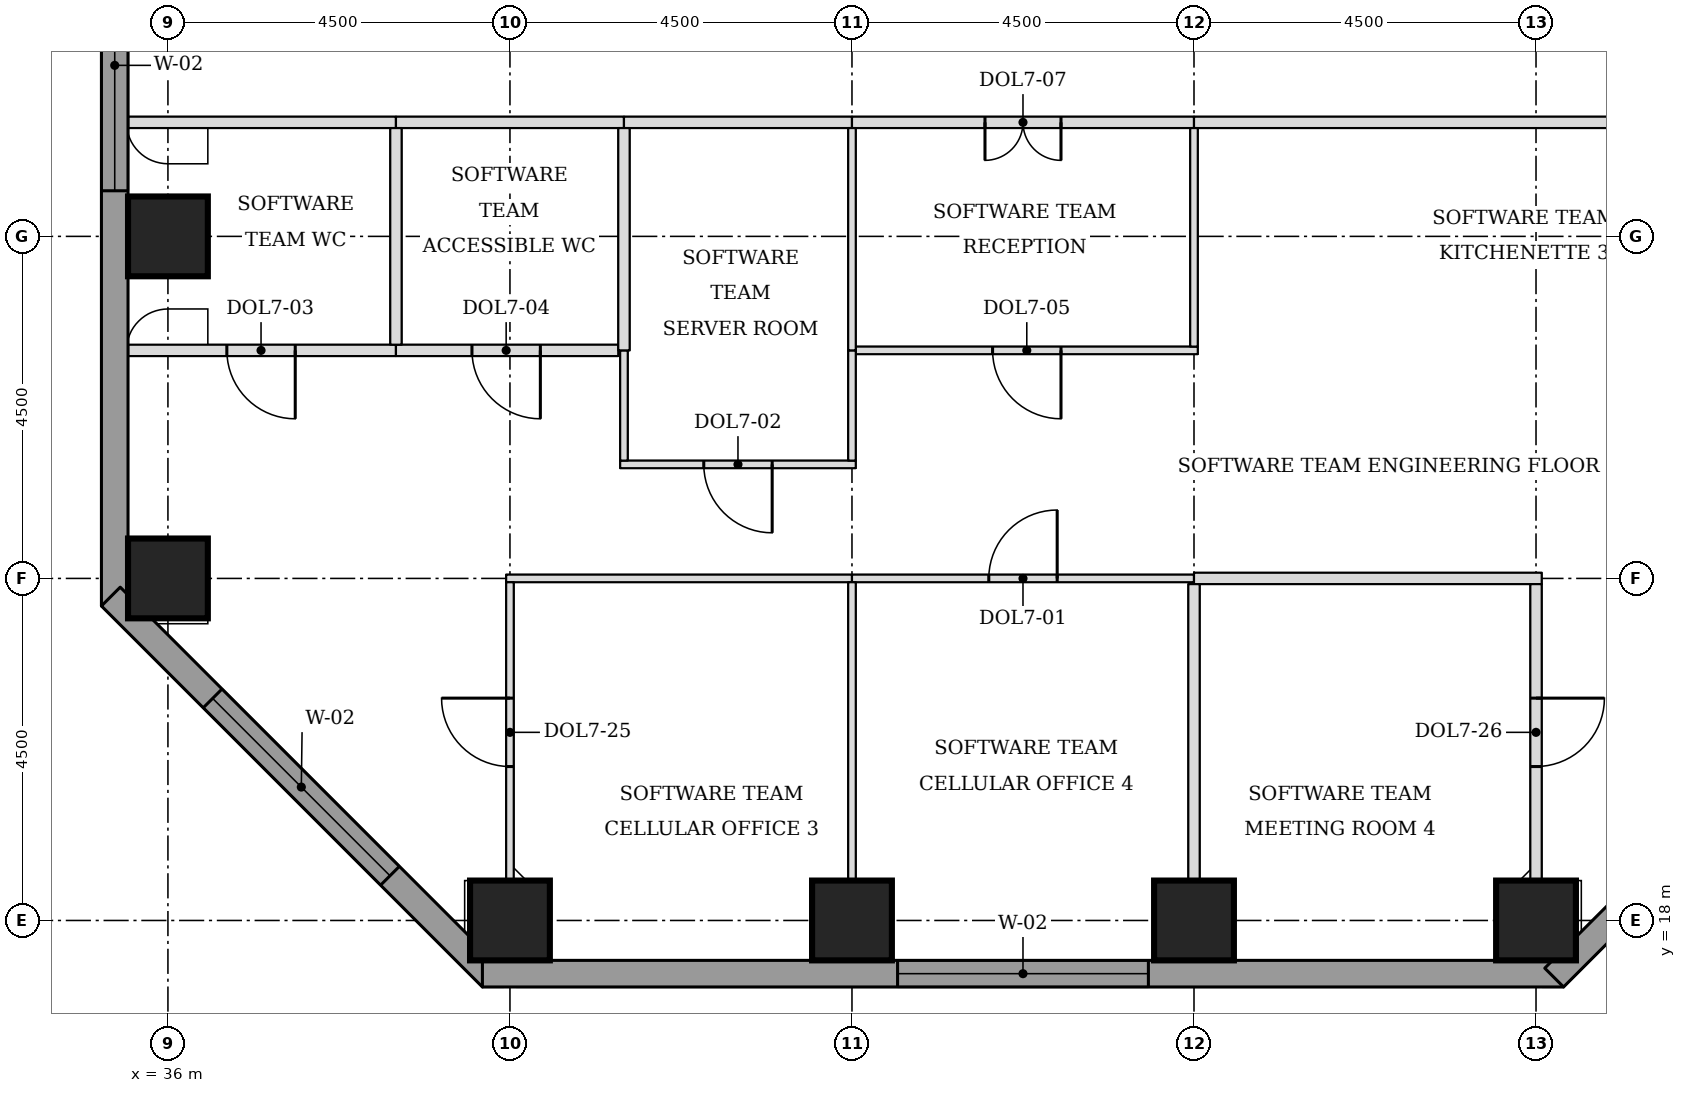
"""IFC4 building model, lengths in metres.
Left out: names, types, materials, properties, quantities, classifications, styles, units other than length and angle.
Written with IfcOpenShell. Run it as: python <this file> out.ifc"""

import sys

from ifc_helpers import new_model, si_unit, direction, frame, frame_2d, origin, origin_2d, place, context, subcontext, project, spatial, rectangle, extrude, element, fill, save


model = new_model("IFC4")
c1 = context("Model", 3, precision=1e-05, world=origin(), true_north=direction((0.0, 1.0)))
c2 = subcontext(c1, "Body", "Model", "MODEL_VIEW")
j1 = project(units=[si_unit("LENGTHUNIT", "METRE"), si_unit("PLANEANGLEUNIT", "RADIAN")], contexts=[c1])
p1 = place(None, origin())
s1 = spatial("IfcSite", under=j1, at=p1, CompositionType="ELEMENT")
p2 = place(p1, origin())
s2 = spatial("IfcBuilding", under=s1, at=p2, CompositionType="ELEMENT")
p3 = place(p2, frame((0.0, 0.0, 127.0)))
s3 = spatial("IfcBuildingStorey", under=s2, at=p3, CompositionType="ELEMENT", Elevation=127.0)
for number, where, z_axis, x_axis in (
    (1, (40.5, 18.0, 0.0), (0.0, 0.0, 1.0), (1.0, 0.0, 0.0)),
    (2, (45.0, 18.0, 0.0), (0.0, 0.0, 1.0), (1.0, 0.0, 0.0)),
    (3, (49.5, 18.0, 0.0), (0.0, 0.0, 1.0), (1.0, 0.0, 0.0)),
    (4, (54.0, 18.0, 0.0), (0.0, 0.0, 1.0), (1.0, 0.0, 0.0)),
    (5, (36.0, 22.5, 0.0), (0.0, 0.0, 1.0), (1.0, 0.0, 0.0)),
    (6, (36.0, 27.0, 0.0), (0.0, 0.0, 1.0), (1.0, 0.0, 0.0)),
):
    element("IfcColumn", number, at=place(p3, frame(where, z_axis=z_axis, x_axis=x_axis)), inside=s3, PredefinedType="COLUMN", context=c2, shape_type="SweptSolid", body=[
        extrude(rectangle(XDim=1.05, YDim=1.05, at=origin_2d()), origin(), (0.0, 0.0, 1.0), 3.7),
    ])
p4 = place(p3, frame((35.3, 39.975, 0.0), z_axis=(0.0, 0.0, 1.0), x_axis=(0.0, -1.0, 0.0)))
e7 = element("IfcWall", 7, at=p4, inside=s3, PredefinedType="STANDARD", context=c2, shape_type="SweptSolid", body=[
    extrude(rectangle(XDim=17.837, YDim=0.35, at=frame_2d((8.919, 0.0))), origin(), (0.0, 0.0, 1.0), 3.525),
])
p5 = place(p4, frame((0.5, 0.0, 0.9)))
e8 = element("IfcOpeningElement", 8, at=p5, cuts=e7, PredefinedType="OPENING", context=c2, shape_type="SweptSolid", body=[
    extrude(rectangle(XDim=3.3, YDim=1.9, at=frame_2d((1.65, 0.95))), frame((0.0, 0.185, 0.0), z_axis=(0.0, -1.0, 0.0), x_axis=(1.0, 0.0, 0.0)), (0.0, 0.0, 1.0), 0.37),
])
p6 = place(p4, frame((9.075, 0.0, 0.9)))
e9 = element("IfcOpeningElement", 9, at=p6, cuts=e7, PredefinedType="OPENING", context=c2, shape_type="SweptSolid", body=[
    extrude(rectangle(XDim=3.3, YDim=1.9, at=frame_2d((1.65, 0.95))), frame((0.0, 0.185, 0.0), z_axis=(0.0, -1.0, 0.0), x_axis=(1.0, 0.0, 0.0)), (0.0, 0.0, 1.0), 0.37),
])
p7 = place(p3, frame((35.249, 22.261, 0.0), z_axis=(0.0, 0.0, 1.0), x_axis=(0.707106781187, -0.707106781187, 0.0)))
e10 = element("IfcWall", 10, at=p7, inside=s3, PredefinedType="STANDARD", context=c2, shape_type="SweptSolid", body=[
    extrude(rectangle(XDim=7.089, YDim=0.35, at=frame_2d((3.544, 0.0))), origin(), (0.0, 0.0, 1.0), 3.525),
])
p8 = place(p7, frame((1.894, 0.0, 0.9)))
e11 = element("IfcOpeningElement", 11, at=p8, cuts=e10, PredefinedType="OPENING", context=c2, shape_type="SweptSolid", body=[
    extrude(rectangle(XDim=3.3, YDim=1.9, at=frame_2d((1.65, 0.95))), frame((0.0, 0.185, 0.0), z_axis=(0.0, -1.0, 0.0), x_axis=(1.0, 0.0, 0.0)), (0.0, 0.0, 1.0), 0.37),
])
p9 = place(p3, frame((40.138, 17.3, 0.0), z_axis=(0.0, 0.0, 1.0), x_axis=(1.0, 0.0, 0.0)))
e12 = element("IfcWall", 12, at=p9, inside=s3, PredefinedType="STANDARD", context=c2, shape_type="SweptSolid", body=[
    extrude(rectangle(XDim=14.225, YDim=0.35, at=frame_2d((7.112, 0.0))), origin(), (0.0, 0.0, 1.0), 3.525),
])
p10 = place(p9, frame((5.462, 0.0, 0.9)))
e13 = element("IfcOpeningElement", 13, at=p10, cuts=e12, PredefinedType="OPENING", context=c2, shape_type="SweptSolid", body=[
    extrude(rectangle(XDim=3.3, YDim=1.9, at=frame_2d((1.65, 0.95))), frame((0.0, 0.185, 0.0), z_axis=(0.0, -1.0, 0.0), x_axis=(1.0, 0.0, 0.0)), (0.0, 0.0, 1.0), 0.37),
])
p11 = place(p3, frame((54.239, 17.249, 0.0), z_axis=(0.0, 0.0, 1.0), x_axis=(0.707106781187, 0.707106781187, 0.0)))
e14 = element("IfcWall", 14, at=p11, inside=s3, PredefinedType="STANDARD", context=c2, shape_type="SweptSolid", body=[
    extrude(rectangle(XDim=7.089, YDim=0.35, at=frame_2d((3.544, 0.0))), origin(), (0.0, 0.0, 1.0), 3.525),
])
p12 = place(p11, frame((1.894, 0.0, 0.9)))
e15 = element("IfcOpeningElement", 15, at=p12, cuts=e14, PredefinedType="OPENING", context=c2, shape_type="SweptSolid", body=[
    extrude(rectangle(XDim=3.3, YDim=1.9, at=frame_2d((1.65, 0.95))), frame((0.0, 0.185, 0.0), z_axis=(0.0, -1.0, 0.0), x_axis=(1.0, 0.0, 0.0)), (0.0, 0.0, 1.0), 0.37),
])
p13 = place(p3, frame((40.45, 22.5, 0.0), z_axis=(0.0, 0.0, 1.0), x_axis=(1.0, 0.0, 0.0)))
e16 = element("IfcWall", 16, at=p13, inside=s3, PredefinedType="PARTITIONING", context=c2, shape_type="SweptSolid", body=[
    extrude(rectangle(XDim=4.55, YDim=0.1, at=frame_2d((2.275, 0.0))), origin(), (0.0, 0.0, 1.0), 2.55),
])
p14 = place(p3, frame((45.0, 22.5, 0.0), z_axis=(0.0, 0.0, 1.0), x_axis=(1.0, 0.0, 0.0)))
e17 = element("IfcWall", 17, at=p14, inside=s3, PredefinedType="PARTITIONING", context=c2, shape_type="SweptSolid", body=[
    extrude(rectangle(XDim=4.5, YDim=0.1, at=frame_2d((2.25, 0.0))), origin(), (0.0, 0.0, 1.0), 2.55),
])
p15 = place(p14, frame((1.8, 0.0, 0.0)))
e18 = element("IfcOpeningElement", 18, at=p15, cuts=e17, PredefinedType="OPENING", context=c2, shape_type="SweptSolid", body=[
    extrude(rectangle(XDim=0.9, YDim=2.1, at=frame_2d((0.45, 1.05))), frame((0.0, 0.06, 0.0), z_axis=(0.0, -1.0, 0.0), x_axis=(1.0, 0.0, 0.0)), (0.0, 0.0, 1.0), 0.12),
])
p16 = place(p3, frame((49.5, 22.5, 0.0), z_axis=(0.0, 0.0, 1.0), x_axis=(1.0, 0.0, 0.0)))
e19 = element("IfcWall", 19, at=p16, inside=s3, PredefinedType="PARTITIONING", context=c2, shape_type="SweptSolid", body=[
    extrude(rectangle(XDim=4.575, YDim=0.15, at=frame_2d((2.288, 0.0))), origin(), (0.0, 0.0, 1.0), 2.55),
])
p17 = place(p3, frame((41.95, 24.0, 0.0), z_axis=(0.0, 0.0, 1.0), x_axis=(1.0, 0.0, 0.0)))
e20 = element("IfcWall", 20, at=p17, inside=s3, PredefinedType="PARTITIONING", context=c2, shape_type="SweptSolid", body=[
    extrude(rectangle(XDim=3.1, YDim=0.1, at=frame_2d((1.55, 0.0))), origin(), (0.0, 0.0, 1.0), 3.55),
])
p18 = place(p17, frame((1.1, 0.0, 0.0)))
e21 = element("IfcOpeningElement", 21, at=p18, cuts=e20, PredefinedType="OPENING", context=c2, shape_type="SweptSolid", body=[
    extrude(rectangle(XDim=0.9, YDim=2.1, at=frame_2d((0.45, 1.05))), frame((0.0, 0.06, 0.0), z_axis=(0.0, -1.0, 0.0), x_axis=(1.0, 0.0, 0.0)), (0.0, 0.0, 1.0), 0.12),
])
p19 = place(p3, frame((35.475, 25.5, 0.0), z_axis=(0.0, 0.0, 1.0), x_axis=(1.0, 0.0, 0.0)))
e22 = element("IfcWall", 22, at=p19, inside=s3, PredefinedType="PARTITIONING", context=c2, shape_type="SweptSolid", body=[
    extrude(rectangle(XDim=3.525, YDim=0.15, at=frame_2d((1.762, 0.0))), origin(), (0.0, 0.0, 1.0), 3.55),
])
p20 = place(p19, frame((1.3, 0.0, 0.0)))
e23 = element("IfcOpeningElement", 23, at=p20, cuts=e22, PredefinedType="OPENING", context=c2, shape_type="SweptSolid", body=[
    extrude(rectangle(XDim=0.9, YDim=2.1, at=frame_2d((0.45, 1.05))), frame((0.0, 0.085, 0.0), z_axis=(0.0, -1.0, 0.0), x_axis=(1.0, 0.0, 0.0)), (0.0, 0.0, 1.0), 0.17),
])
p21 = place(p3, frame((39.0, 25.5, 0.0), z_axis=(0.0, 0.0, 1.0), x_axis=(1.0, 0.0, 0.0)))
e24 = element("IfcWall", 24, at=p21, inside=s3, PredefinedType="PARTITIONING", context=c2, shape_type="SweptSolid", body=[
    extrude(rectangle(XDim=2.925, YDim=0.15, at=frame_2d((1.462, 0.0))), origin(), (0.0, 0.0, 1.0), 3.55),
])
p22 = place(p21, frame((1.0, 0.0, 0.0)))
e25 = element("IfcOpeningElement", 25, at=p22, cuts=e24, PredefinedType="OPENING", context=c2, shape_type="SweptSolid", body=[
    extrude(rectangle(XDim=0.9, YDim=2.1, at=frame_2d((0.45, 1.05))), frame((0.0, 0.085, 0.0), z_axis=(0.0, -1.0, 0.0), x_axis=(1.0, 0.0, 0.0)), (0.0, 0.0, 1.0), 0.17),
])
p23 = place(p3, frame((45.05, 25.5, 0.0), z_axis=(0.0, 0.0, 1.0), x_axis=(1.0, 0.0, 0.0)))
e26 = element("IfcWall", 26, at=p23, inside=s3, PredefinedType="PARTITIONING", context=c2, shape_type="SweptSolid", body=[
    extrude(rectangle(XDim=4.5, YDim=0.1, at=frame_2d((2.25, 0.0))), origin(), (0.0, 0.0, 1.0), 3.55),
])
p24 = place(p23, frame((1.8, 0.0, 0.0)))
e27 = element("IfcOpeningElement", 27, at=p24, cuts=e26, PredefinedType="OPENING", context=c2, shape_type="SweptSolid", body=[
    extrude(rectangle(XDim=0.9, YDim=2.1, at=frame_2d((0.45, 1.05))), frame((0.0, 0.06, 0.0), z_axis=(0.0, -1.0, 0.0), x_axis=(1.0, 0.0, 0.0)), (0.0, 0.0, 1.0), 0.12),
])
p25 = place(p3, frame((35.475, 28.5, 0.0), z_axis=(0.0, 0.0, 1.0), x_axis=(1.0, 0.0, 0.0)))
e28 = element("IfcWall", 28, at=p25, inside=s3, PredefinedType="PARTITIONING", context=c2, shape_type="SweptSolid", body=[
    extrude(rectangle(XDim=3.525, YDim=0.15, at=frame_2d((1.762, 0.0))), origin(), (0.0, 0.0, 1.0), 3.55),
])
for number, where, z_axis, x_axis in (
    (29, (39.0, 28.5, 0.0), (0.0, 0.0, 1.0), (1.0, 0.0, 0.0)),
    (30, (42.0, 28.5, 0.0), (0.0, 0.0, 1.0), (1.0, 0.0, 0.0)),
):
    element("IfcWall", number, at=place(p3, frame(where, z_axis=z_axis, x_axis=x_axis)), inside=s3, PredefinedType="PARTITIONING", context=c2, shape_type="SweptSolid", body=[
        extrude(rectangle(XDim=3.0, YDim=0.15, at=frame_2d((1.5, 0.0))), origin(), (0.0, 0.0, 1.0), 3.55),
    ])
p26 = place(p3, frame((45.0, 28.5, 0.0), z_axis=(0.0, 0.0, 1.0), x_axis=(1.0, 0.0, 0.0)))
e31 = element("IfcWall", 31, at=p26, inside=s3, PredefinedType="PARTITIONING", context=c2, shape_type="SweptSolid", body=[
    extrude(rectangle(XDim=4.5, YDim=0.15, at=frame_2d((2.25, 0.0))), origin(), (0.0, 0.0, 1.0), 3.55),
])
p27 = place(p26, frame((1.75, 0.0, 0.0)))
e32 = element("IfcOpeningElement", 32, at=p27, cuts=e31, PredefinedType="OPENING", context=c2, shape_type="SweptSolid", body=[
    extrude(rectangle(XDim=1.0, YDim=2.1, at=frame_2d((0.5, 1.05))), frame((0.0, 0.085, 0.0), z_axis=(0.0, -1.0, 0.0), x_axis=(1.0, 0.0, 0.0)), (0.0, 0.0, 1.0), 0.17),
])
p28 = place(p3, frame((49.5, 28.5, 0.0), z_axis=(0.0, 0.0, 1.0), x_axis=(1.0, 0.0, 0.0)))
e33 = element("IfcWall", 33, at=p28, inside=s3, PredefinedType="PARTITIONING", context=c2, shape_type="SweptSolid", body=[
    extrude(rectangle(XDim=6.0, YDim=0.15, at=frame_2d((3.0, 0.0))), origin(), (0.0, 0.0, 1.0), 3.55),
])
p29 = place(p3, frame((45.0, 17.475, 0.0), z_axis=(0.0, 0.0, 1.0), x_axis=(0.0, 1.0, 0.0)))
e34 = element("IfcWall", 34, at=p29, inside=s3, PredefinedType="PARTITIONING", context=c2, shape_type="SweptSolid", body=[
    extrude(rectangle(XDim=4.975, YDim=0.1, at=frame_2d((2.487, 0.0))), origin(), (0.0, 0.0, 1.0), 3.55),
])
p30 = place(p3, frame((49.5, 17.475, 0.0), z_axis=(0.0, 0.0, 1.0), x_axis=(0.0, 1.0, 0.0)))
e35 = element("IfcWall", 35, at=p30, inside=s3, PredefinedType="PARTITIONING", context=c2, shape_type="SweptSolid", body=[
    extrude(rectangle(XDim=4.95, YDim=0.15, at=frame_2d((2.475, 0.0))), origin(), (0.0, 0.0, 1.0), 3.55),
])
p31 = place(p3, frame((40.5, 18.525, 0.0), z_axis=(0.0, 0.0, 1.0), x_axis=(0.0, 1.0, 0.0)))
e36 = element("IfcWall", 36, at=p31, inside=s3, PredefinedType="PARTITIONING", context=c2, shape_type="SweptSolid", body=[
    extrude(rectangle(XDim=3.925, YDim=0.1, at=frame_2d((1.962, 0.0))), origin(), (0.0, 0.0, 1.0), 3.55),
])
p32 = place(p31, frame((1.5, 0.0, 0.0)))
e37 = element("IfcOpeningElement", 37, at=p32, cuts=e36, PredefinedType="OPENING", context=c2, shape_type="SweptSolid", body=[
    extrude(rectangle(XDim=0.9, YDim=2.1, at=frame_2d((0.45, 1.05))), frame((0.0, 0.06, 0.0), z_axis=(0.0, -1.0, 0.0), x_axis=(1.0, 0.0, 0.0)), (0.0, 0.0, 1.0), 0.12),
])
p33 = place(p3, frame((54.0, 18.525, 0.0), z_axis=(0.0, 0.0, 1.0), x_axis=(0.0, 1.0, 0.0)))
e38 = element("IfcWall", 38, at=p33, inside=s3, PredefinedType="PARTITIONING", context=c2, shape_type="SweptSolid", body=[
    extrude(rectangle(XDim=3.9, YDim=0.15, at=frame_2d((1.95, 0.0))), origin(), (0.0, 0.0, 1.0), 3.55),
])
p34 = place(p33, frame((1.5, 0.0, 0.0)))
e39 = element("IfcOpeningElement", 39, at=p34, cuts=e38, PredefinedType="OPENING", context=c2, shape_type="SweptSolid", body=[
    extrude(rectangle(XDim=0.9, YDim=2.1, at=frame_2d((0.45, 1.05))), frame((0.0, 0.085, 0.0), z_axis=(0.0, -1.0, 0.0), x_axis=(1.0, 0.0, 0.0)), (0.0, 0.0, 1.0), 0.17),
])
for number, where, z_axis, x_axis in (
    (40, (42.0, 24.05, 0.0), (0.0, 0.0, 1.0), (0.0, 1.0, 0.0)),
    (41, (45.0, 24.05, 0.0), (0.0, 0.0, 1.0), (0.0, 1.0, 0.0)),
):
    element("IfcWall", number, at=place(p3, frame(where, z_axis=z_axis, x_axis=x_axis)), inside=s3, PredefinedType="PARTITIONING", context=c2, shape_type="SweptSolid", body=[
        extrude(rectangle(XDim=1.45, YDim=0.1, at=frame_2d((0.725, 0.0))), origin(), (0.0, 0.0, 1.0), 3.55),
    ])
p35 = place(p3, frame((42.0, 25.5, 0.0), z_axis=(0.0, 0.0, 1.0), x_axis=(0.0, 1.0, 0.0)))
e42 = element("IfcWall", 42, at=p35, inside=s3, PredefinedType="PARTITIONING", context=c2, shape_type="SweptSolid", body=[
    extrude(rectangle(XDim=2.925, YDim=0.15, at=frame_2d((1.462, 0.0))), origin(), (0.0, 0.0, 1.0), 3.55),
])
p36 = place(p3, frame((45.0, 25.5, 0.0), z_axis=(0.0, 0.0, 1.0), x_axis=(0.0, 1.0, 0.0)))
e43 = element("IfcWall", 43, at=p36, inside=s3, PredefinedType="PARTITIONING", context=c2, shape_type="SweptSolid", body=[
    extrude(rectangle(XDim=2.925, YDim=0.1, at=frame_2d((1.462, 0.0))), origin(), (0.0, 0.0, 1.0), 3.55),
])
p37 = place(p3, frame((49.5, 25.55, 0.0), z_axis=(0.0, 0.0, 1.0), x_axis=(0.0, 1.0, 0.0)))
e44 = element("IfcWall", 44, at=p37, inside=s3, PredefinedType="PARTITIONING", context=c2, shape_type="SweptSolid", body=[
    extrude(rectangle(XDim=2.875, YDim=0.1, at=frame_2d((1.438, 0.0))), origin(), (0.0, 0.0, 1.0), 3.55),
])
p38 = place(p3, frame((39.0, 25.575, 0.0), z_axis=(0.0, 0.0, 1.0), x_axis=(0.0, 1.0, 0.0)))
e45 = element("IfcWall", 45, at=p38, inside=s3, PredefinedType="PARTITIONING", context=c2, shape_type="SweptSolid", body=[
    extrude(rectangle(XDim=2.85, YDim=0.15, at=frame_2d((1.425, 0.0))), origin(), (0.0, 0.0, 1.0), 3.55),
])
p39 = place(p6, origin())
e46 = element("IfcWindow", 46, at=p39, inside=s3, PartitioningType="SINGLE_PANEL", PredefinedType="WINDOW", context=c2, shape_type="SweptSolid", body=[
    extrude(rectangle(XDim=3.3, YDim=1.9, at=frame_2d((1.65, 0.95))), frame((0.0, 0.085, 0.0), z_axis=(0.0, -1.0, 0.0), x_axis=(1.0, 0.0, 0.0)), (0.0, 0.0, 1.0), 0.06),
])
fill(e9, e46)
p40 = place(p8, origin())
e47 = element("IfcWindow", 47, at=p40, inside=s3, PartitioningType="SINGLE_PANEL", PredefinedType="WINDOW", context=c2, shape_type="SweptSolid", body=[
    extrude(rectangle(XDim=3.3, YDim=1.9, at=frame_2d((1.65, 0.95))), frame((0.0, 0.085, 0.0), z_axis=(0.0, -1.0, 0.0), x_axis=(1.0, 0.0, 0.0)), (0.0, 0.0, 1.0), 0.06),
])
fill(e11, e47)
p41 = place(p10, origin())
e48 = element("IfcWindow", 48, at=p41, inside=s3, PartitioningType="SINGLE_PANEL", PredefinedType="WINDOW", context=c2, shape_type="SweptSolid", body=[
    extrude(rectangle(XDim=3.3, YDim=1.9, at=frame_2d((1.65, 0.95))), frame((0.0, 0.085, 0.0), z_axis=(0.0, -1.0, 0.0), x_axis=(1.0, 0.0, 0.0)), (0.0, 0.0, 1.0), 0.06),
])
fill(e13, e48)
p42 = place(p27, frame((1.0, 0.0, 0.0), z_axis=(0.0, 0.0, 1.0), x_axis=(-1.0, 0.0, 0.0)))
e49 = element("IfcDoor", 49, at=p42, inside=s3, OperationType="DOUBLE_DOOR_SINGLE_SWING", PredefinedType="DOOR", context=c2, shape_type="SweptSolid", body=[
    extrude(rectangle(XDim=1.0, YDim=2.1, at=frame_2d((0.5, 1.05))), frame((0.0, 0.025, 0.0), z_axis=(0.0, -1.0, 0.0), x_axis=(1.0, 0.0, 0.0)), (0.0, 0.0, 1.0), 0.05),
])
fill(e32, e49)
p43 = place(p24, frame((0.9, 0.0, 0.0), z_axis=(0.0, 0.0, 1.0), x_axis=(-1.0, 0.0, 0.0)))
e50 = element("IfcDoor", 50, at=p43, inside=s3, OperationType="SINGLE_SWING_LEFT", PredefinedType="DOOR", context=c2, shape_type="SweptSolid", body=[
    extrude(rectangle(XDim=0.9, YDim=2.1, at=frame_2d((0.45, 1.05))), frame((0.0, 0.025, 0.0), z_axis=(0.0, -1.0, 0.0), x_axis=(1.0, 0.0, 0.0)), (0.0, 0.0, 1.0), 0.05),
])
fill(e27, e50)
p44 = place(p22, frame((0.9, 0.0, 0.0), z_axis=(0.0, 0.0, 1.0), x_axis=(-1.0, 0.0, 0.0)))
e51 = element("IfcDoor", 51, at=p44, inside=s3, OperationType="SINGLE_SWING_LEFT", PredefinedType="DOOR", context=c2, shape_type="SweptSolid", body=[
    extrude(rectangle(XDim=0.9, YDim=2.1, at=frame_2d((0.45, 1.05))), frame((0.0, 0.025, 0.0), z_axis=(0.0, -1.0, 0.0), x_axis=(1.0, 0.0, 0.0)), (0.0, 0.0, 1.0), 0.05),
])
fill(e25, e51)
p45 = place(p32, origin())
e52 = element("IfcDoor", 52, at=p45, inside=s3, OperationType="SINGLE_SWING_RIGHT", PredefinedType="DOOR", context=c2, shape_type="SweptSolid", body=[
    extrude(rectangle(XDim=0.9, YDim=2.1, at=frame_2d((0.45, 1.05))), frame((0.0, 0.025, 0.0), z_axis=(0.0, -1.0, 0.0), x_axis=(1.0, 0.0, 0.0)), (0.0, 0.0, 1.0), 0.05),
])
fill(e37, e52)
p46 = place(p15, origin())
e53 = element("IfcDoor", 53, at=p46, inside=s3, OperationType="SINGLE_SWING_RIGHT", PredefinedType="DOOR", context=c2, shape_type="SweptSolid", body=[
    extrude(rectangle(XDim=0.9, YDim=2.1, at=frame_2d((0.45, 1.05))), frame((0.0, 0.025, 0.0), z_axis=(0.0, -1.0, 0.0), x_axis=(1.0, 0.0, 0.0)), (0.0, 0.0, 1.0), 0.05),
])
fill(e18, e53)
p47 = place(p34, frame((0.9, 0.0, 0.0), z_axis=(0.0, 0.0, 1.0), x_axis=(-1.0, 0.0, 0.0)))
e54 = element("IfcDoor", 54, at=p47, inside=s3, OperationType="SINGLE_SWING_LEFT", PredefinedType="DOOR", context=c2, shape_type="SweptSolid", body=[
    extrude(rectangle(XDim=0.9, YDim=2.1, at=frame_2d((0.45, 1.05))), frame((0.0, 0.025, 0.0), z_axis=(0.0, -1.0, 0.0), x_axis=(1.0, 0.0, 0.0)), (0.0, 0.0, 1.0), 0.05),
])
fill(e39, e54)
p48 = place(p18, frame((0.9, 0.0, 0.0), z_axis=(0.0, 0.0, 1.0), x_axis=(-1.0, 0.0, 0.0)))
e55 = element("IfcDoor", 55, at=p48, inside=s3, OperationType="SINGLE_SWING_LEFT", PredefinedType="DOOR", context=c2, shape_type="SweptSolid", body=[
    extrude(rectangle(XDim=0.9, YDim=2.1, at=frame_2d((0.45, 1.05))), frame((0.0, 0.025, 0.0), z_axis=(0.0, -1.0, 0.0), x_axis=(1.0, 0.0, 0.0)), (0.0, 0.0, 1.0), 0.05),
])
fill(e21, e55)
p49 = place(p20, frame((0.9, 0.0, 0.0), z_axis=(0.0, 0.0, 1.0), x_axis=(-1.0, 0.0, 0.0)))
e56 = element("IfcDoor", 56, at=p49, inside=s3, OperationType="SINGLE_SWING_LEFT", PredefinedType="DOOR", context=c2, shape_type="SweptSolid", body=[
    extrude(rectangle(XDim=0.9, YDim=2.1, at=frame_2d((0.45, 1.05))), frame((0.0, 0.025, 0.0), z_axis=(0.0, -1.0, 0.0), x_axis=(1.0, 0.0, 0.0)), (0.0, 0.0, 1.0), 0.05),
])
fill(e23, e56)
save(model, sys.argv[1])
